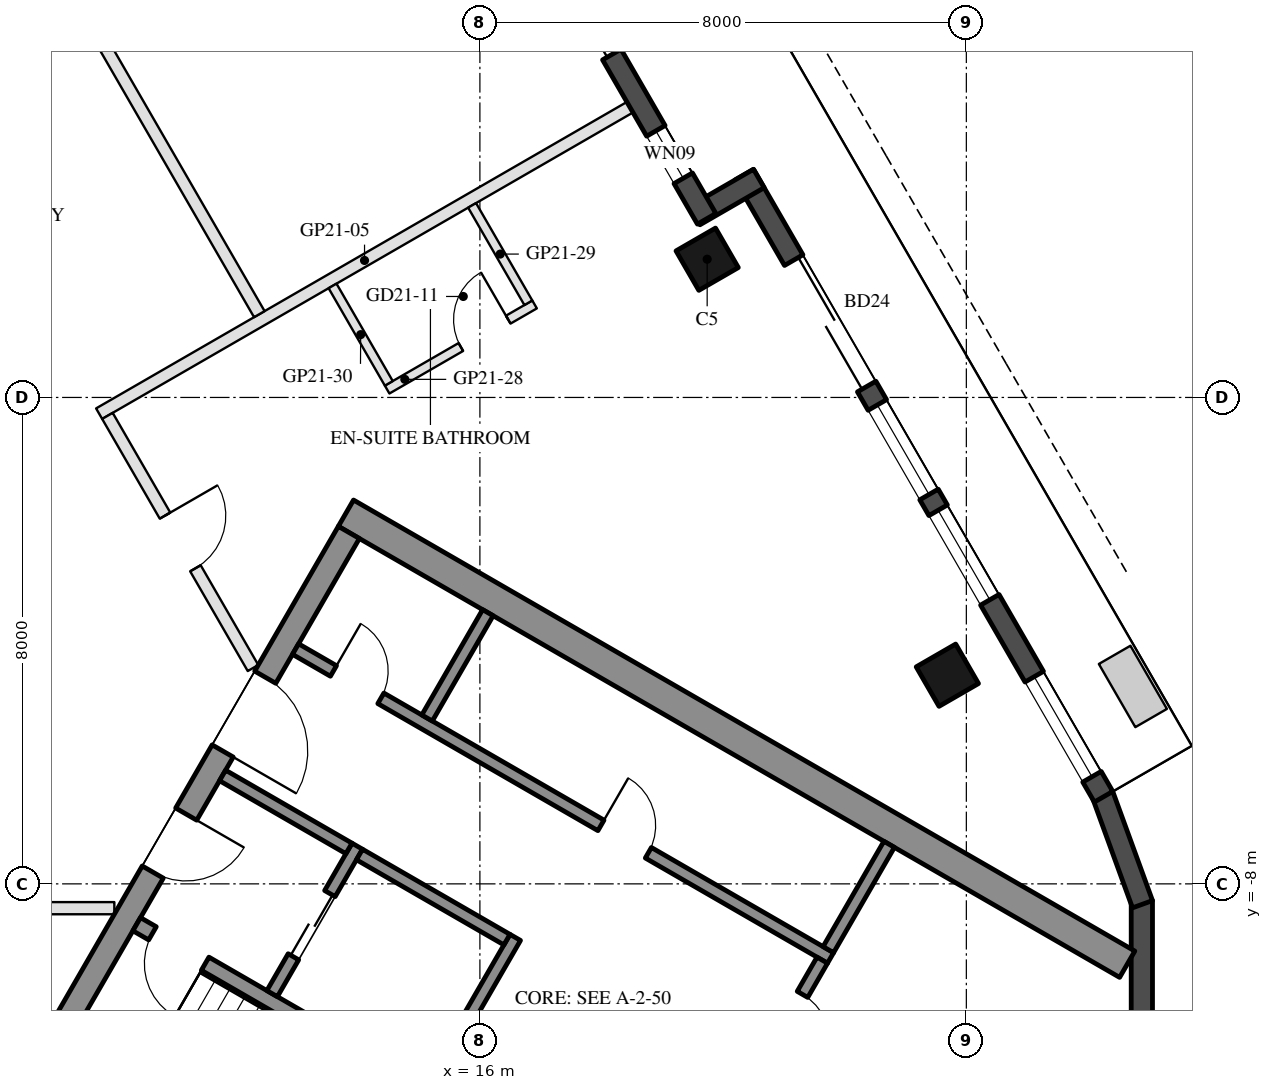
"""IFC4 building model, lengths in metres.
Left out: names, types, materials, properties, quantities, classifications, styles, units other than length and angle.
Written with IfcOpenShell. Run it as: python <this file> out.ifc"""

import sys

from ifc_helpers import new_model, si_unit, direction, frame, frame_2d, origin, origin_2d, place, context, subcontext, project, spatial, rectangle, hollow_rectangle, extrude, element, fill, save


model = new_model("IFC4")
c1 = context("Model", 3, precision=1e-05, world=origin(), true_north=direction((0.0, 1.0)))
c2 = subcontext(c1, "Body", "Model", "MODEL_VIEW")
j1 = project(units=[si_unit("LENGTHUNIT", "METRE"), si_unit("PLANEANGLEUNIT", "RADIAN")], contexts=[c1])
p1 = place(None, origin())
s1 = spatial("IfcSite", under=j1, at=p1, CompositionType="ELEMENT")
p2 = place(p1, origin())
s2 = spatial("IfcBuilding", under=s1, at=p2, CompositionType="ELEMENT")
p3 = place(p2, frame((0.0, 0.0, 216.9)))
s3 = spatial("IfcBuildingStorey", under=s2, at=p3, CompositionType="ELEMENT", Elevation=216.9)
for number, where, z_axis, x_axis in (
    (1, (23.688, -4.568, 0.0), (0.0, 0.0, 1.0), (-0.5, 0.866, 0.0)),
    (2, (19.738, 2.273, 0.0), (0.0, 0.0, 1.0), (-0.5, 0.866, 0.0)),
):
    element("IfcColumn", number, at=place(p3, frame(where, z_axis=z_axis, x_axis=x_axis)), inside=s3, PredefinedType="COLUMN", context=c2, shape_type="SweptSolid", body=[
        extrude(hollow_rectangle(XDim=0.75, YDim=0.75, WallThickness=0.035, at=origin_2d()), origin(), (0.0, 0.0, 1.0), 3.7),
    ])
for number, where, z_axis, x_axis in (
    (3, (26.244, -11.92, 0.0), (0.0, 0.0, 1.0), (0.342, 0.94, 0.0)),
    (4, (26.886, -10.185, 0.0), (0.0, 0.0, 1.0), (0.0, 1.0, 0.0)),
    (5, (26.897, -8.335, 0.0), (0.0, 0.0, 1.0), (-0.342, 0.94, 0.0)),
):
    element("IfcWall", number, at=place(p3, frame(where, z_axis=z_axis, x_axis=x_axis)), inside=s3, PredefinedType="SOLIDWALL", context=c2, shape_type="SweptSolid", body=[
        extrude(rectangle(XDim=1.91, YDim=0.35, at=frame_2d((0.955, 0.0))), origin(), (0.0, 0.0, 1.0), 3.55),
    ])
p4 = place(p3, frame((26.257, -6.567, 0.0), z_axis=(0.0, 0.0, 1.0), x_axis=(-0.500023526245, 0.866011820475, 0.0)))
e6 = element("IfcWall", 6, at=p4, inside=s3, PredefinedType="SOLIDWALL", context=c2, shape_type="SweptSolid", body=[
    extrude(rectangle(XDim=11.816, YDim=0.35, at=frame_2d((5.908, 0.0))), origin(), (0.0, 0.0, 1.0), 3.55),
])
p5 = place(p4, frame((0.38, 0.0, 0.3)))
e7 = element("IfcOpeningElement", 7, at=p5, cuts=e6, PredefinedType="OPENING", context=c2, shape_type="SweptSolid", body=[
    extrude(rectangle(XDim=1.9, YDim=2.65, at=frame_2d((0.95, 1.325))), frame((0.0, 0.185, 0.0), z_axis=(0.0, -1.0, 0.0), x_axis=(1.0, 0.0, 0.0)), (0.0, 0.0, 1.0), 0.37),
])
p6 = place(p4, frame((7.791, 0.0, 0.0)))
e8 = element("IfcOpeningElement", 8, at=p6, cuts=e6, PredefinedType="OPENING", context=c2, shape_type="SweptSolid", body=[
    extrude(rectangle(XDim=2.4, YDim=2.4, at=frame_2d((1.2, 1.2))), frame((0.0, 0.185, 0.0), z_axis=(0.0, -1.0, 0.0), x_axis=(1.0, 0.0, 0.0)), (0.0, 0.0, 1.0), 0.37),
])
p7 = place(p4, frame((3.741, 0.0, 0.3)))
e9 = element("IfcOpeningElement", 9, at=p7, cuts=e6, PredefinedType="OPENING", context=c2, shape_type="SweptSolid", body=[
    extrude(rectangle(XDim=1.7, YDim=2.65, at=frame_2d((0.85, 1.325))), frame((0.0, 0.185, 0.0), z_axis=(0.0, -1.0, 0.0), x_axis=(1.0, 0.0, 0.0)), (0.0, 0.0, 1.0), 0.37),
])
p8 = place(p4, frame((5.741, 0.0, 0.3)))
e10 = element("IfcOpeningElement", 10, at=p8, cuts=e6, PredefinedType="OPENING", context=c2, shape_type="SweptSolid", body=[
    extrude(rectangle(XDim=1.7, YDim=2.65, at=frame_2d((0.85, 1.325))), frame((0.0, 0.185, 0.0), z_axis=(0.0, -1.0, 0.0), x_axis=(1.0, 0.0, 0.0)), (0.0, 0.0, 1.0), 0.37),
])
p9 = place(p3, frame((20.588, 3.601, 0.0), z_axis=(0.0, 0.0, 1.0), x_axis=(-0.866005645448, -0.500034220881, 0.0)))
e11 = element("IfcWall", 11, at=p9, inside=s3, PredefinedType="SOLIDWALL", context=c2, shape_type="SweptSolid", body=[
    extrude(rectangle(XDim=1.22, YDim=0.35, at=frame_2d((0.61, 0.0))), origin(), (0.0, 0.0, 1.0), 3.55),
])
p10 = place(p3, frame((19.729, 2.938, 0.0), z_axis=(0.0, 0.0, 1.0), x_axis=(-0.499976430342, 0.866039011305, 0.0)))
e12 = element("IfcWall", 12, at=p10, inside=s3, PredefinedType="SOLIDWALL", context=c2, shape_type="SweptSolid", body=[
    extrude(rectangle(XDim=6.74, YDim=0.35, at=frame_2d((3.37, 0.0))), origin(), (0.0, 0.0, 1.0), 3.55),
])
p11 = place(p10, frame((0.77, 0.0, 0.3)))
e13 = element("IfcOpeningElement", 13, at=p11, cuts=e12, PredefinedType="OPENING", context=c2, shape_type="SweptSolid", body=[
    extrude(rectangle(XDim=0.9, YDim=2.65, at=frame_2d((0.45, 1.325))), frame((0.0, 0.185, 0.0), z_axis=(0.0, -1.0, 0.0), x_axis=(1.0, 0.0, 0.0)), (0.0, 0.0, 1.0), 0.37),
])
p12 = place(p10, frame((3.12, 0.0, 0.0)))
e14 = element("IfcOpeningElement", 14, at=p12, cuts=e12, PredefinedType="OPENING", context=c2, shape_type="SweptSolid", body=[
    extrude(rectangle(XDim=2.4, YDim=2.4, at=frame_2d((1.2, 1.2))), frame((0.0, 0.185, 0.0), z_axis=(0.0, -1.0, 0.0), x_axis=(1.0, 0.0, 0.0)), (0.0, 0.0, 1.0), 0.37),
])
p13 = place(p3, frame((13.797, -1.903, 0.0), z_axis=(0.0, 0.0, 1.0), x_axis=(0.866025009528, -0.500000682871, 0.0)))
e15 = element("IfcWall", 15, at=p13, inside=s3, PredefinedType="SHEAR", context=c2, shape_type="SweptSolid", body=[
    extrude(rectangle(XDim=14.837, YDim=0.5, at=frame_2d((7.418, 0.0))), origin(), (0.0, 0.0, 1.0), 3.5),
])
p14 = place(p3, frame((8.845, -10.88, 0.0), z_axis=(0.0, 0.0, 1.0), x_axis=(0.500004234368, 0.866022959057, 0.0)))
e16 = element("IfcWall", 16, at=p14, inside=s3, PredefinedType="SHEAR", context=c2, shape_type="SweptSolid", body=[
    extrude(rectangle(XDim=10.0, YDim=0.4, at=frame_2d((5.0, 0.0))), origin(), (0.0, 0.0, 1.0), 3.5),
])
p15 = place(p14, frame((3.55, 0.0, 0.0)))
e17 = element("IfcOpeningElement", 17, at=p15, cuts=e16, PredefinedType="OPENING", context=c2, shape_type="SweptSolid", body=[
    extrude(rectangle(XDim=1.1, YDim=2.1, at=frame_2d((0.55, 1.05))), frame((0.0, 0.21, 0.0), z_axis=(0.0, -1.0, 0.0), x_axis=(1.0, 0.0, 0.0)), (0.0, 0.0, 1.0), 0.42),
])
p16 = place(p14, frame((5.85, 0.0, 0.0)))
e18 = element("IfcOpeningElement", 18, at=p16, cuts=e16, PredefinedType="OPENING", context=c2, shape_type="SweptSolid", body=[
    extrude(rectangle(XDim=1.4, YDim=2.1, at=frame_2d((0.7, 1.05))), frame((0.0, 0.21, 0.0), z_axis=(0.0, -1.0, 0.0), x_axis=(1.0, 0.0, 0.0)), (0.0, 0.0, 1.0), 0.42),
])
p17 = place(p3, frame((10.356, -8.664, 0.0), z_axis=(0.0, 0.0, 1.0), x_axis=(0.866028629588, -0.499994412703, 0.0)))
e19 = element("IfcWall", 19, at=p17, inside=s3, PredefinedType="SHEAR", context=c2, shape_type="SweptSolid", body=[
    extrude(rectangle(XDim=6.45, YDim=0.25, at=frame_2d((3.225, 0.0))), origin(), (0.0, 0.0, 1.0), 3.5),
])
p18 = place(p17, frame((0.3, 0.0, 0.0)))
e20 = element("IfcOpeningElement", 20, at=p18, cuts=e19, PredefinedType="OPENING", context=c2, shape_type="SweptSolid", body=[
    extrude(rectangle(XDim=1.0, YDim=2.1, at=frame_2d((0.5, 1.05))), frame((0.0, 0.135, 0.0), z_axis=(0.0, -1.0, 0.0), x_axis=(1.0, 0.0, 0.0)), (0.0, 0.0, 1.0), 0.27),
])
p19 = place(p3, frame((15.181, -11.305, 0.0), z_axis=(0.0, 0.0, 1.0), x_axis=(0.49994636267, 0.866056369097, 0.0)))
e21 = element("IfcWall", 21, at=p19, inside=s3, PredefinedType="SHEAR", context=c2, shape_type="SweptSolid", body=[
    extrude(rectangle(XDim=2.8, YDim=0.2, at=frame_2d((1.4, 0.0))), origin(), (0.0, 0.0, 1.0), 3.5),
])
p20 = place(p3, frame((12.583, -9.805, 0.0), z_axis=(0.0, 0.0, 1.0), x_axis=(0.49994636267, 0.866056369097, 0.0)))
e22 = element("IfcWall", 22, at=p20, inside=s3, PredefinedType="SHEAR", context=c2, shape_type="SweptSolid", body=[
    extrude(rectangle(XDim=2.8, YDim=0.2, at=frame_2d((1.4, 0.0))), origin(), (0.0, 0.0, 1.0), 3.5),
])
p21 = place(p20, frame((0.7, 0.0, 0.0)))
e23 = element("IfcOpeningElement", 23, at=p21, cuts=e22, PredefinedType="OPENING", context=c2, shape_type="SweptSolid", body=[
    extrude(rectangle(XDim=1.2, YDim=2.1, at=frame_2d((0.6, 1.05))), frame((0.0, 0.11, 0.0), z_axis=(0.0, -1.0, 0.0), x_axis=(1.0, 0.0, 0.0)), (0.0, 0.0, 1.0), 0.22),
])
p22 = place(p3, frame((11.768, -6.217, 0.0), z_axis=(0.0, 0.0, 1.0), x_axis=(0.866050077142, -0.499957262057, 0.0)))
e24 = element("IfcWall", 24, at=p22, inside=s3, PredefinedType="SHEAR", context=c2, shape_type="SweptSolid", body=[
    extrude(rectangle(XDim=2.4, YDim=0.2, at=frame_2d((1.2, 0.0))), origin(), (0.0, 0.0, 1.0), 3.5),
])
p23 = place(p3, frame((14.02, -7.517, 0.0), z_axis=(0.0, 0.0, 1.0), x_axis=(0.866034573852, -0.49998411664, 0.0)))
e25 = element("IfcWall", 25, at=p23, inside=s3, PredefinedType="SHEAR", context=c2, shape_type="SweptSolid", body=[
    extrude(rectangle(XDim=2.8, YDim=0.2, at=frame_2d((1.4, 0.0))), origin(), (0.0, 0.0, 1.0), 3.5),
])
p24 = place(p3, frame((12.968, -4.138, 0.0), z_axis=(0.0, 0.0, 1.0), x_axis=(0.866028328073, -0.49999493495, 0.0)))
e26 = element("IfcWall", 26, at=p24, inside=s3, PredefinedType="SHEAR", context=c2, shape_type="SweptSolid", body=[
    extrude(rectangle(XDim=10.16, YDim=0.2, at=frame_2d((5.08, 0.0))), origin(), (0.0, 0.0, 1.0), 3.5),
])
p25 = place(p24, frame((0.72, 0.0, 0.0)))
e27 = element("IfcOpeningElement", 27, at=p25, cuts=e26, PredefinedType="OPENING", context=c2, shape_type="SweptSolid", body=[
    extrude(rectangle(XDim=0.9, YDim=2.1, at=frame_2d((0.45, 1.05))), frame((0.0, 0.11, 0.0), z_axis=(0.0, -1.0, 0.0), x_axis=(1.0, 0.0, 0.0)), (0.0, 0.0, 1.0), 0.22),
])
p26 = place(p24, frame((5.8, 0.0, 0.0)))
e28 = element("IfcOpeningElement", 28, at=p26, cuts=e26, PredefinedType="OPENING", context=c2, shape_type="SweptSolid", body=[
    extrude(rectangle(XDim=0.9, YDim=2.1, at=frame_2d((0.45, 1.05))), frame((0.0, 0.11, 0.0), z_axis=(0.0, -1.0, 0.0), x_axis=(1.0, 0.0, 0.0)), (0.0, 0.0, 1.0), 0.22),
])
p27 = place(p3, frame((20.43, -11.333, 0.0), z_axis=(0.0, 0.0, 1.0), x_axis=(0.500001309137, 0.866024647952, 0.0)))
e29 = element("IfcWall", 29, at=p27, inside=s3, PredefinedType="SHEAR", context=c2, shape_type="SweptSolid", body=[
    extrude(rectangle(XDim=2.4, YDim=0.2, at=frame_2d((1.2, 0.0))), origin(), (0.0, 0.0, 1.0), 3.5),
])
p28 = place(p27, frame((0.85, 0.0, 0.0)))
e30 = element("IfcOpeningElement", 30, at=p28, cuts=e29, PredefinedType="OPENING", context=c2, shape_type="SweptSolid", body=[
    extrude(rectangle(XDim=0.9, YDim=2.1, at=frame_2d((0.45, 1.05))), frame((0.0, 0.11, 0.0), z_axis=(0.0, -1.0, 0.0), x_axis=(1.0, 0.0, 0.0)), (0.0, 0.0, 1.0), 0.22),
])
for number, where, z_axis, x_axis in (
    (31, (15.131, -5.272, 0.0), (0.0, 0.0, 1.0), (0.5, 0.866, 0.0)),
    (32, (21.73, -9.082, 0.0), (0.0, 0.0, 1.0), (0.5, 0.866, 0.0)),
):
    element("IfcWall", number, at=place(p3, frame(where, z_axis=z_axis, x_axis=x_axis)), inside=s3, PredefinedType="SHEAR", context=c2, shape_type="SweptSolid", body=[
        extrude(rectangle(XDim=2.0, YDim=0.2, at=frame_2d((1.0, 0.0))), origin(), (0.0, 0.0, 1.0), 3.5),
    ])
p29 = place(p3, frame((18.468, 4.773, 0.0), z_axis=(0.0, 0.0, 1.0), x_axis=(-0.866033125095, -0.499986626058, 0.0)))
e33 = element("IfcWall", 33, at=p29, inside=s3, PredefinedType="PARTITIONING", context=c2, shape_type="SweptSolid", body=[
    extrude(rectangle(XDim=10.08, YDim=0.2, at=frame_2d((5.04, 0.0))), origin(), (0.0, 0.0, 1.0), 3.06),
])
p30 = place(p3, frame((9.988, -8.4, 0.0), z_axis=(0.0, 0.0, 1.0), x_axis=(-1.0, 0.0, 0.0)))
e34 = element("IfcWall", 34, at=p30, inside=s3, PredefinedType="PARTITIONING", context=c2, shape_type="SweptSolid", body=[
    extrude(rectangle(XDim=3.782, YDim=0.2, at=frame_2d((1.891, 0.0))), origin(), (0.0, 0.0, 1.0), 2.95),
])
p31 = place(p30, frame((1.391, 0.0, 0.0)))
e35 = element("IfcOpeningElement", 35, at=p31, cuts=e34, PredefinedType="OPENING", context=c2, shape_type="SweptSolid", body=[
    extrude(rectangle(XDim=1.0, YDim=2.1, at=frame_2d((0.5, 1.05))), frame((0.0, 0.11, 0.0), z_axis=(0.0, -1.0, 0.0), x_axis=(1.0, 0.0, 0.0)), (0.0, 0.0, 1.0), 0.22),
])
p32 = place(p3, frame((9.875, -0.303, 0.0), z_axis=(0.0, 0.0, 1.0), x_axis=(0.500026984917, -0.866009823475, 0.0)))
e36 = element("IfcWall", 36, at=p32, inside=s3, PredefinedType="PARTITIONING", context=c2, shape_type="SweptSolid", body=[
    extrude(rectangle(XDim=4.788, YDim=0.2, at=frame_2d((2.394, 0.0))), origin(), (0.0, 0.0, 1.0), 2.95),
])
p33 = place(p32, frame((1.894, 0.0, 0.0)))
e37 = element("IfcOpeningElement", 37, at=p33, cuts=e36, PredefinedType="OPENING", context=c2, shape_type="SweptSolid", body=[
    extrude(rectangle(XDim=1.0, YDim=2.1, at=frame_2d((0.5, 1.05))), frame((0.0, 0.11, 0.0), z_axis=(0.0, -1.0, 0.0), x_axis=(1.0, 0.0, 0.0)), (0.0, 0.0, 1.0), 0.22),
])
p34 = place(p3, frame((14.474, 0.13, 0.0), z_axis=(0.0, 0.0, 1.0), x_axis=(0.866056369097, 0.49994636267, 0.0)))
e38 = element("IfcWall", 38, at=p34, inside=s3, PredefinedType="PARTITIONING", context=c2, shape_type="SweptSolid", body=[
    extrude(rectangle(XDim=2.8, YDim=0.15, at=frame_2d((1.4, 0.0))), origin(), (0.0, 0.0, 1.0), 3.55),
])
p35 = place(p34, frame((1.4, 0.0, 0.0)))
e39 = element("IfcOpeningElement", 39, at=p35, cuts=e38, PredefinedType="OPENING", context=c2, shape_type="SweptSolid", body=[
    extrude(rectangle(XDim=0.9, YDim=2.1, at=frame_2d((0.45, 1.05))), frame((0.0, 0.085, 0.0), z_axis=(0.0, -1.0, 0.0), x_axis=(1.0, 0.0, 0.0)), (0.0, 0.0, 1.0), 0.17),
])
for number, where, z_axis, x_axis in (
    (40, (16.797, 1.557, 0.0), (0.0, 0.0, 1.0), (-0.5, 0.866, 0.0)),
    (41, (14.502, 0.232, 0.0), (0.0, 0.0, 1.0), (-0.5, 0.866, 0.0)),
):
    element("IfcWall", number, at=place(p3, frame(where, z_axis=z_axis, x_axis=x_axis)), inside=s3, PredefinedType="PARTITIONING", context=c2, shape_type="SweptSolid", body=[
        extrude(rectangle(XDim=1.85, YDim=0.15, at=frame_2d((0.925, 0.0))), origin(), (0.0, 0.0, 1.0), 3.55),
    ])
p36 = place(p3, frame((6.873, 10.896, 0.0), z_axis=(0.0, 0.0, 1.0), x_axis=(0.499996545922, -0.866027397988, 0.0)))
e42 = element("IfcWall", 42, at=p36, inside=s3, PredefinedType="PARTITIONING", context=c2, shape_type="SweptSolid", body=[
    extrude(rectangle(XDim=11.0, YDim=0.2, at=frame_2d((5.5, 0.0))), origin(), (0.0, 0.0, 1.0), 2.95),
])
p37 = place(p36, frame((2.45, 0.0, 0.0)))
e43 = element("IfcOpeningElement", 43, at=p37, cuts=e42, PredefinedType="OPENING", context=c2, shape_type="SweptSolid", body=[
    extrude(rectangle(XDim=1.0, YDim=2.1, at=frame_2d((0.5, 1.05))), frame((0.0, 0.11, 0.0), z_axis=(0.0, -1.0, 0.0), x_axis=(1.0, 0.0, 0.0)), (0.0, 0.0, 1.0), 0.22),
])
p38 = place(p5, origin())
e44 = element("IfcWindow", 44, at=p38, inside=s3, PartitioningType="SINGLE_PANEL", PredefinedType="WINDOW", context=c2, shape_type="SweptSolid", body=[
    extrude(rectangle(XDim=1.9, YDim=2.65, at=frame_2d((0.95, 1.325))), frame((0.0, 0.03, 0.0), z_axis=(0.0, -1.0, 0.0), x_axis=(1.0, 0.0, 0.0)), (0.0, 0.0, 1.0), 0.06),
])
fill(e7, e44)
p39 = place(p6, frame((2.4, 0.0, 0.0), z_axis=(0.0, 0.0, 1.0), x_axis=(-1.0, 0.0, 0.0)))
e45 = element("IfcDoor", 45, at=p39, inside=s3, OperationType="SLIDING_TO_LEFT", PredefinedType="DOOR", context=c2, shape_type="SweptSolid", body=[
    extrude(rectangle(XDim=2.4, YDim=2.4, at=frame_2d((1.2, 1.2))), frame((0.0, 0.025, 0.0), z_axis=(0.0, -1.0, 0.0), x_axis=(1.0, 0.0, 0.0)), (0.0, 0.0, 1.0), 0.05),
])
fill(e8, e45)
p40 = place(p7, origin())
e46 = element("IfcWindow", 46, at=p40, inside=s3, PartitioningType="SINGLE_PANEL", PredefinedType="WINDOW", context=c2, shape_type="SweptSolid", body=[
    extrude(rectangle(XDim=1.7, YDim=2.65, at=frame_2d((0.85, 1.325))), frame((0.0, 0.03, 0.0), z_axis=(0.0, -1.0, 0.0), x_axis=(1.0, 0.0, 0.0)), (0.0, 0.0, 1.0), 0.06),
])
fill(e9, e46)
p41 = place(p8, origin())
e47 = element("IfcWindow", 47, at=p41, inside=s3, PartitioningType="SINGLE_PANEL", PredefinedType="WINDOW", context=c2, shape_type="SweptSolid", body=[
    extrude(rectangle(XDim=1.7, YDim=2.65, at=frame_2d((0.85, 1.325))), frame((0.0, 0.03, 0.0), z_axis=(0.0, -1.0, 0.0), x_axis=(1.0, 0.0, 0.0)), (0.0, 0.0, 1.0), 0.06),
])
fill(e10, e47)
p42 = place(p11, origin())
e48 = element("IfcWindow", 48, at=p42, inside=s3, PartitioningType="SINGLE_PANEL", PredefinedType="WINDOW", context=c2, shape_type="SweptSolid", body=[
    extrude(rectangle(XDim=0.9, YDim=2.65, at=frame_2d((0.45, 1.325))), frame((0.0, 0.03, 0.0), z_axis=(0.0, -1.0, 0.0), x_axis=(1.0, 0.0, 0.0)), (0.0, 0.0, 1.0), 0.06),
])
fill(e13, e48)
p43 = place(p12, frame((2.4, 0.0, 0.0), z_axis=(0.0, 0.0, 1.0), x_axis=(-1.0, 0.0, 0.0)))
e49 = element("IfcDoor", 49, at=p43, inside=s3, OperationType="SLIDING_TO_LEFT", PredefinedType="DOOR", context=c2, shape_type="SweptSolid", body=[
    extrude(rectangle(XDim=2.4, YDim=2.4, at=frame_2d((1.2, 1.2))), frame((0.0, 0.025, 0.0), z_axis=(0.0, -1.0, 0.0), x_axis=(1.0, 0.0, 0.0)), (0.0, 0.0, 1.0), 0.05),
])
fill(e14, e49)
p44 = place(p21, origin())
e50 = element("IfcDoor", 50, at=p44, inside=s3, OperationType="DOUBLE_DOOR_SLIDING", PredefinedType="DOOR", context=c2, shape_type="SweptSolid", body=[
    extrude(rectangle(XDim=1.2, YDim=2.1, at=frame_2d((0.6, 1.05))), frame((0.0, 0.025, 0.0), z_axis=(0.0, -1.0, 0.0), x_axis=(1.0, 0.0, 0.0)), (0.0, 0.0, 1.0), 0.05),
])
fill(e23, e50)
p45 = place(p25, origin())
e51 = element("IfcDoor", 51, at=p45, inside=s3, OperationType="SINGLE_SWING_LEFT", PredefinedType="DOOR", context=c2, shape_type="SweptSolid", body=[
    extrude(rectangle(XDim=0.9, YDim=2.1, at=frame_2d((0.45, 1.05))), frame((0.0, 0.025, 0.0), z_axis=(0.0, -1.0, 0.0), x_axis=(1.0, 0.0, 0.0)), (0.0, 0.0, 1.0), 0.05),
])
fill(e27, e51)
p46 = place(p26, origin())
e52 = element("IfcDoor", 52, at=p46, inside=s3, OperationType="SINGLE_SWING_LEFT", PredefinedType="DOOR", context=c2, shape_type="SweptSolid", body=[
    extrude(rectangle(XDim=0.9, YDim=2.1, at=frame_2d((0.45, 1.05))), frame((0.0, 0.025, 0.0), z_axis=(0.0, -1.0, 0.0), x_axis=(1.0, 0.0, 0.0)), (0.0, 0.0, 1.0), 0.05),
])
fill(e28, e52)
p47 = place(p28, frame((0.9, 0.0, 0.0), z_axis=(0.0, 0.0, 1.0), x_axis=(-1.0, 0.0, 0.0)))
e53 = element("IfcDoor", 53, at=p47, inside=s3, OperationType="SINGLE_SWING_RIGHT", PredefinedType="DOOR", context=c2, shape_type="SweptSolid", body=[
    extrude(rectangle(XDim=0.9, YDim=2.1, at=frame_2d((0.45, 1.05))), frame((0.0, 0.025, 0.0), z_axis=(0.0, -1.0, 0.0), x_axis=(1.0, 0.0, 0.0)), (0.0, 0.0, 1.0), 0.05),
])
fill(e30, e53)
p48 = place(p15, frame((1.1, 0.0, 0.0), z_axis=(0.0, 0.0, 1.0), x_axis=(-1.0, 0.0, 0.0)))
e54 = element("IfcDoor", 54, at=p48, inside=s3, OperationType="SINGLE_SWING_LEFT", PredefinedType="DOOR", context=c2, shape_type="SweptSolid", body=[
    extrude(rectangle(XDim=1.1, YDim=2.1, at=frame_2d((0.55, 1.05))), frame((0.0, 0.025, 0.0), z_axis=(0.0, -1.0, 0.0), x_axis=(1.0, 0.0, 0.0)), (0.0, 0.0, 1.0), 0.05),
])
fill(e17, e54)
p49 = place(p16, frame((1.4, 0.0, 0.0), z_axis=(0.0, 0.0, 1.0), x_axis=(-1.0, 0.0, 0.0)))
e55 = element("IfcDoor", 55, at=p49, inside=s3, OperationType="DOUBLE_DOOR_SINGLE_SWING", PredefinedType="DOOR", context=c2, shape_type="SweptSolid", body=[
    extrude(rectangle(XDim=1.4, YDim=2.1, at=frame_2d((0.7, 1.05))), frame((0.0, 0.025, 0.0), z_axis=(0.0, -1.0, 0.0), x_axis=(1.0, 0.0, 0.0)), (0.0, 0.0, 1.0), 0.05),
])
fill(e18, e55)
p50 = place(p18, frame((1.0, 0.0, 0.0), z_axis=(0.0, 0.0, 1.0), x_axis=(-1.0, 0.0, 0.0)))
e56 = element("IfcDoor", 56, at=p50, inside=s3, OperationType="SINGLE_SWING_LEFT", PredefinedType="DOOR", context=c2, shape_type="SweptSolid", body=[
    extrude(rectangle(XDim=1.0, YDim=2.1, at=frame_2d((0.5, 1.05))), frame((0.0, 0.025, 0.0), z_axis=(0.0, -1.0, 0.0), x_axis=(1.0, 0.0, 0.0)), (0.0, 0.0, 1.0), 0.05),
])
fill(e20, e56)
p51 = place(p35, origin())
e57 = element("IfcDoor", 57, at=p51, inside=s3, OperationType="SINGLE_SWING_RIGHT", PredefinedType="DOOR", context=c2, shape_type="SweptSolid", body=[
    extrude(rectangle(XDim=0.9, YDim=2.1, at=frame_2d((0.45, 1.05))), frame((0.0, 0.025, 0.0), z_axis=(0.0, -1.0, 0.0), x_axis=(1.0, 0.0, 0.0)), (0.0, 0.0, 1.0), 0.05),
])
fill(e39, e57)
p52 = place(p33, origin())
e58 = element("IfcDoor", 58, at=p52, inside=s3, OperationType="SINGLE_SWING_LEFT", PredefinedType="DOOR", context=c2, shape_type="SweptSolid", body=[
    extrude(rectangle(XDim=1.0, YDim=2.1, at=frame_2d((0.5, 1.05))), frame((0.0, 0.025, 0.0), z_axis=(0.0, -1.0, 0.0), x_axis=(1.0, 0.0, 0.0)), (0.0, 0.0, 1.0), 0.05),
])
fill(e37, e58)
save(model, sys.argv[1])
